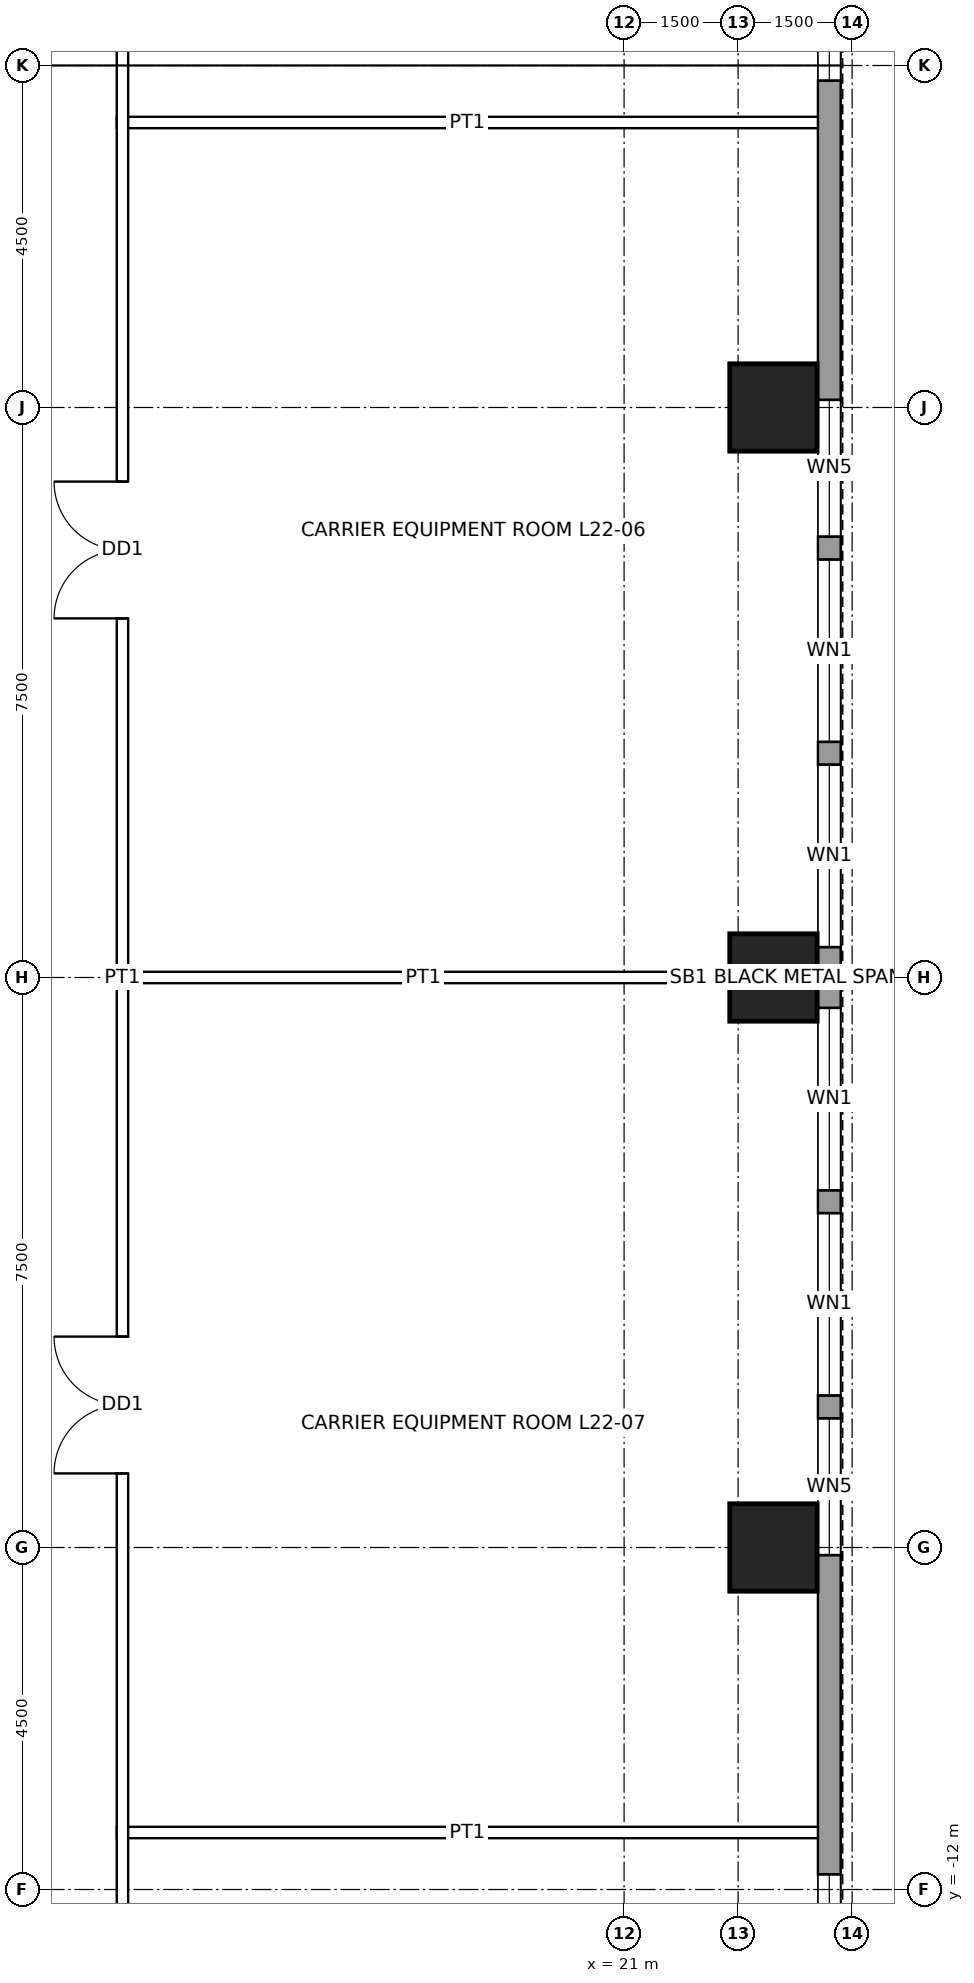
"""IFC4 building model, lengths in metres.
Left out: names, types, materials, properties, quantities, classifications, styles, units other than length and angle.
Written with IfcOpenShell. Run it as: python <this file> out.ifc"""

import sys

from ifc_helpers import new_model, si_unit, direction, frame, frame_2d, origin, origin_2d, place, context, subcontext, project, spatial, rectangle, hollow_rectangle, extrude, element, fill, save


model = new_model("IFC4")
c1 = context("Model", 3, precision=1e-05, world=origin(), true_north=direction((0.0, 1.0)))
c2 = subcontext(c1, "Body", "Model", "MODEL_VIEW")
j1 = project(units=[si_unit("LENGTHUNIT", "METRE"), si_unit("PLANEANGLEUNIT", "RADIAN")], contexts=[c1])
p1 = place(None, origin())
s1 = spatial("IfcSite", under=j1, at=p1, CompositionType="ELEMENT")
p2 = place(p1, origin())
s2 = spatial("IfcBuilding", under=s1, at=p2, CompositionType="ELEMENT")
p3 = place(p2, frame((0.0, 0.0, 113.4)))
s3 = spatial("IfcBuildingStorey", under=s2, at=p3, CompositionType="ELEMENT", Elevation=113.4)
for number, where, z_axis, x_axis in (
    (1, (22.965, 7.5, 0.0), (0.0, 0.0, 1.0), (1.0, 0.0, 0.0)),
    (2, (22.965, 0.0, 0.0), (0.0, 0.0, 1.0), (1.0, 0.0, 0.0)),
    (3, (22.965, -7.5, 0.0), (0.0, 0.0, 1.0), (1.0, 0.0, 0.0)),
):
    element("IfcColumn", number, at=place(p3, frame(where, z_axis=z_axis, x_axis=x_axis)), inside=s3, PredefinedType="COLUMN", context=c2, shape_type="SweptSolid", body=[
        extrude(hollow_rectangle(XDim=1.15, YDim=1.15, WallThickness=0.075, at=origin_2d()), origin(), (0.0, 0.0, 1.0), 4.5),
    ])
p4 = place(p3, frame((23.7, 16.2, 0.0), z_axis=(0.0, 0.0, 1.0), x_axis=(0.0, -1.0, 0.0)))
e4 = element("IfcWall", 4, at=p4, inside=s3, PredefinedType="SOLIDWALL", context=c2, shape_type="SweptSolid", body=[
    extrude(rectangle(XDim=32.4, YDim=0.3, at=frame_2d((16.2, 0.0))), origin(), (0.0, 0.0, 1.0), 4.3),
])
p5 = place(p4, frame((2.0, 0.0, 1.0)))
e5 = element("IfcOpeningElement", 5, at=p5, cuts=e4, PredefinedType="OPENING", context=c2, shape_type="SweptSolid", body=[
    extrude(rectangle(XDim=2.4, YDim=1.2, at=frame_2d((1.2, 0.6))), frame((0.0, 0.16, 0.0), z_axis=(0.0, -1.0, 0.0), x_axis=(1.0, 0.0, 0.0)), (0.0, 0.0, 1.0), 0.32),
])
p6 = place(p4, frame((8.6, 0.0, 1.0)))
e6 = element("IfcOpeningElement", 6, at=p6, cuts=e4, PredefinedType="OPENING", context=c2, shape_type="SweptSolid", body=[
    extrude(rectangle(XDim=1.8, YDim=1.2, at=frame_2d((0.9, 0.6))), frame((0.0, 0.16, 0.0), z_axis=(0.0, -1.0, 0.0), x_axis=(1.0, 0.0, 0.0)), (0.0, 0.0, 1.0), 0.32),
])
p7 = place(p4, frame((10.7, 0.0, 1.0)))
e7 = element("IfcOpeningElement", 7, at=p7, cuts=e4, PredefinedType="OPENING", context=c2, shape_type="SweptSolid", body=[
    extrude(rectangle(XDim=2.4, YDim=1.2, at=frame_2d((1.2, 0.6))), frame((0.0, 0.16, 0.0), z_axis=(0.0, -1.0, 0.0), x_axis=(1.0, 0.0, 0.0)), (0.0, 0.0, 1.0), 0.32),
])
p8 = place(p4, frame((13.4, 0.0, 1.0)))
e8 = element("IfcOpeningElement", 8, at=p8, cuts=e4, PredefinedType="OPENING", context=c2, shape_type="SweptSolid", body=[
    extrude(rectangle(XDim=2.4, YDim=1.2, at=frame_2d((1.2, 0.6))), frame((0.0, 0.16, 0.0), z_axis=(0.0, -1.0, 0.0), x_axis=(1.0, 0.0, 0.0)), (0.0, 0.0, 1.0), 0.32),
])
p9 = place(p4, frame((16.6, 0.0, 1.0)))
e9 = element("IfcOpeningElement", 9, at=p9, cuts=e4, PredefinedType="OPENING", context=c2, shape_type="SweptSolid", body=[
    extrude(rectangle(XDim=2.4, YDim=1.2, at=frame_2d((1.2, 0.6))), frame((0.0, 0.16, 0.0), z_axis=(0.0, -1.0, 0.0), x_axis=(1.0, 0.0, 0.0)), (0.0, 0.0, 1.0), 0.32),
])
p10 = place(p4, frame((19.3, 0.0, 1.0)))
e10 = element("IfcOpeningElement", 10, at=p10, cuts=e4, PredefinedType="OPENING", context=c2, shape_type="SweptSolid", body=[
    extrude(rectangle(XDim=2.4, YDim=1.2, at=frame_2d((1.2, 0.6))), frame((0.0, 0.16, 0.0), z_axis=(0.0, -1.0, 0.0), x_axis=(1.0, 0.0, 0.0)), (0.0, 0.0, 1.0), 0.32),
])
p11 = place(p4, frame((22.0, 0.0, 1.0)))
e11 = element("IfcOpeningElement", 11, at=p11, cuts=e4, PredefinedType="OPENING", context=c2, shape_type="SweptSolid", body=[
    extrude(rectangle(XDim=1.8, YDim=1.2, at=frame_2d((0.9, 0.6))), frame((0.0, 0.16, 0.0), z_axis=(0.0, -1.0, 0.0), x_axis=(1.0, 0.0, 0.0)), (0.0, 0.0, 1.0), 0.32),
])
p12 = place(p4, frame((28.0, 0.0, 1.0)))
e12 = element("IfcOpeningElement", 12, at=p12, cuts=e4, PredefinedType="OPENING", context=c2, shape_type="SweptSolid", body=[
    extrude(rectangle(XDim=2.4, YDim=1.2, at=frame_2d((1.2, 0.6))), frame((0.0, 0.16, 0.0), z_axis=(0.0, -1.0, 0.0), x_axis=(1.0, 0.0, 0.0)), (0.0, 0.0, 1.0), 0.32),
])
p13 = place(p3, frame((14.325, -11.25, 0.0), z_axis=(0.0, 0.0, 1.0), x_axis=(1.0, 0.0, 0.0)))
e13 = element("IfcWall", 13, at=p13, inside=s3, PredefinedType="PARTITIONING", context=c2, shape_type="SweptSolid", body=[
    extrude(rectangle(XDim=9.225, YDim=0.15, at=frame_2d((4.613, 0.0))), origin(), (0.0, 0.0, 1.0), 3.431),
])
p14 = place(p3, frame((14.325, 0.0, 0.0), z_axis=(0.0, 0.0, 1.0), x_axis=(1.0, 0.0, 0.0)))
e14 = element("IfcWall", 14, at=p14, inside=s3, PredefinedType="PARTITIONING", context=c2, shape_type="SweptSolid", body=[
    extrude(rectangle(XDim=8.065, YDim=0.15, at=frame_2d((4.032, 0.0))), origin(), (0.0, 0.0, 1.0), 3.431),
])
p15 = place(p3, frame((14.325, 11.25, 0.0), z_axis=(0.0, 0.0, 1.0), x_axis=(1.0, 0.0, 0.0)))
e15 = element("IfcWall", 15, at=p15, inside=s3, PredefinedType="PARTITIONING", context=c2, shape_type="SweptSolid", body=[
    extrude(rectangle(XDim=9.225, YDim=0.15, at=frame_2d((4.613, 0.0))), origin(), (0.0, 0.0, 1.0), 3.431),
])
p16 = place(p3, frame((14.4, -14.475, 0.0), z_axis=(0.0, 0.0, 1.0), x_axis=(0.0, 1.0, 0.0)))
e16 = element("IfcWall", 16, at=p16, inside=s3, PredefinedType="PARTITIONING", context=c2, shape_type="SweptSolid", body=[
    extrude(rectangle(XDim=28.95, YDim=0.15, at=frame_2d((14.475, 0.0))), origin(), (0.0, 0.0, 1.0), 4.3),
])
p17 = place(p16, frame((19.2, 0.0, 0.0)))
e17 = element("IfcOpeningElement", 17, at=p17, cuts=e16, PredefinedType="OPENING", context=c2, shape_type="SweptSolid", body=[
    extrude(rectangle(XDim=1.8, YDim=2.4, at=frame_2d((0.9, 1.2))), frame((0.0, 0.085, 0.0), z_axis=(0.0, -1.0, 0.0), x_axis=(1.0, 0.0, 0.0)), (0.0, 0.0, 1.0), 0.17),
])
p18 = place(p16, frame((7.95, 0.0, 0.0)))
e18 = element("IfcOpeningElement", 18, at=p18, cuts=e16, PredefinedType="OPENING", context=c2, shape_type="SweptSolid", body=[
    extrude(rectangle(XDim=1.8, YDim=2.4, at=frame_2d((0.9, 1.2))), frame((0.0, 0.085, 0.0), z_axis=(0.0, -1.0, 0.0), x_axis=(1.0, 0.0, 0.0)), (0.0, 0.0, 1.0), 0.17),
])
p19 = place(p5, origin())
e19 = element("IfcWindow", 19, at=p19, inside=s3, PartitioningType="SINGLE_PANEL", PredefinedType="WINDOW", context=c2, shape_type="SweptSolid", body=[
    extrude(rectangle(XDim=2.4, YDim=1.2, at=frame_2d((1.2, 0.6))), frame((0.0, 0.03, 0.0), z_axis=(0.0, -1.0, 0.0), x_axis=(1.0, 0.0, 0.0)), (0.0, 0.0, 1.0), 0.06),
])
fill(e5, e19)
p20 = place(p6, origin())
e20 = element("IfcWindow", 20, at=p20, inside=s3, PartitioningType="SINGLE_PANEL", PredefinedType="WINDOW", context=c2, shape_type="SweptSolid", body=[
    extrude(rectangle(XDim=1.8, YDim=1.2, at=frame_2d((0.9, 0.6))), frame((0.0, 0.03, 0.0), z_axis=(0.0, -1.0, 0.0), x_axis=(1.0, 0.0, 0.0)), (0.0, 0.0, 1.0), 0.06),
])
fill(e6, e20)
p21 = place(p7, origin())
e21 = element("IfcWindow", 21, at=p21, inside=s3, PartitioningType="SINGLE_PANEL", PredefinedType="WINDOW", context=c2, shape_type="SweptSolid", body=[
    extrude(rectangle(XDim=2.4, YDim=1.2, at=frame_2d((1.2, 0.6))), frame((0.0, 0.03, 0.0), z_axis=(0.0, -1.0, 0.0), x_axis=(1.0, 0.0, 0.0)), (0.0, 0.0, 1.0), 0.06),
])
fill(e7, e21)
p22 = place(p8, origin())
e22 = element("IfcWindow", 22, at=p22, inside=s3, PartitioningType="SINGLE_PANEL", PredefinedType="WINDOW", context=c2, shape_type="SweptSolid", body=[
    extrude(rectangle(XDim=2.4, YDim=1.2, at=frame_2d((1.2, 0.6))), frame((0.0, 0.03, 0.0), z_axis=(0.0, -1.0, 0.0), x_axis=(1.0, 0.0, 0.0)), (0.0, 0.0, 1.0), 0.06),
])
fill(e8, e22)
p23 = place(p9, origin())
e23 = element("IfcWindow", 23, at=p23, inside=s3, PartitioningType="SINGLE_PANEL", PredefinedType="WINDOW", context=c2, shape_type="SweptSolid", body=[
    extrude(rectangle(XDim=2.4, YDim=1.2, at=frame_2d((1.2, 0.6))), frame((0.0, 0.03, 0.0), z_axis=(0.0, -1.0, 0.0), x_axis=(1.0, 0.0, 0.0)), (0.0, 0.0, 1.0), 0.06),
])
fill(e9, e23)
p24 = place(p10, origin())
e24 = element("IfcWindow", 24, at=p24, inside=s3, PartitioningType="SINGLE_PANEL", PredefinedType="WINDOW", context=c2, shape_type="SweptSolid", body=[
    extrude(rectangle(XDim=2.4, YDim=1.2, at=frame_2d((1.2, 0.6))), frame((0.0, 0.03, 0.0), z_axis=(0.0, -1.0, 0.0), x_axis=(1.0, 0.0, 0.0)), (0.0, 0.0, 1.0), 0.06),
])
fill(e10, e24)
p25 = place(p11, origin())
e25 = element("IfcWindow", 25, at=p25, inside=s3, PartitioningType="SINGLE_PANEL", PredefinedType="WINDOW", context=c2, shape_type="SweptSolid", body=[
    extrude(rectangle(XDim=1.8, YDim=1.2, at=frame_2d((0.9, 0.6))), frame((0.0, 0.03, 0.0), z_axis=(0.0, -1.0, 0.0), x_axis=(1.0, 0.0, 0.0)), (0.0, 0.0, 1.0), 0.06),
])
fill(e11, e25)
p26 = place(p12, origin())
e26 = element("IfcWindow", 26, at=p26, inside=s3, PartitioningType="SINGLE_PANEL", PredefinedType="WINDOW", context=c2, shape_type="SweptSolid", body=[
    extrude(rectangle(XDim=2.4, YDim=1.2, at=frame_2d((1.2, 0.6))), frame((0.0, 0.03, 0.0), z_axis=(0.0, -1.0, 0.0), x_axis=(1.0, 0.0, 0.0)), (0.0, 0.0, 1.0), 0.06),
])
fill(e12, e26)
p27 = place(p17, origin())
e27 = element("IfcDoor", 27, at=p27, inside=s3, OperationType="DOUBLE_DOOR_SINGLE_SWING", PredefinedType="DOOR", context=c2, shape_type="SweptSolid", body=[
    extrude(rectangle(XDim=1.8, YDim=2.4, at=frame_2d((0.9, 1.2))), frame((0.0, 0.025, 0.0), z_axis=(0.0, -1.0, 0.0), x_axis=(1.0, 0.0, 0.0)), (0.0, 0.0, 1.0), 0.05),
])
fill(e17, e27)
p28 = place(p18, origin())
e28 = element("IfcDoor", 28, at=p28, inside=s3, OperationType="DOUBLE_DOOR_SINGLE_SWING", PredefinedType="DOOR", context=c2, shape_type="SweptSolid", body=[
    extrude(rectangle(XDim=1.8, YDim=2.4, at=frame_2d((0.9, 1.2))), frame((0.0, 0.025, 0.0), z_axis=(0.0, -1.0, 0.0), x_axis=(1.0, 0.0, 0.0)), (0.0, 0.0, 1.0), 0.05),
])
fill(e18, e28)
save(model, sys.argv[1])
